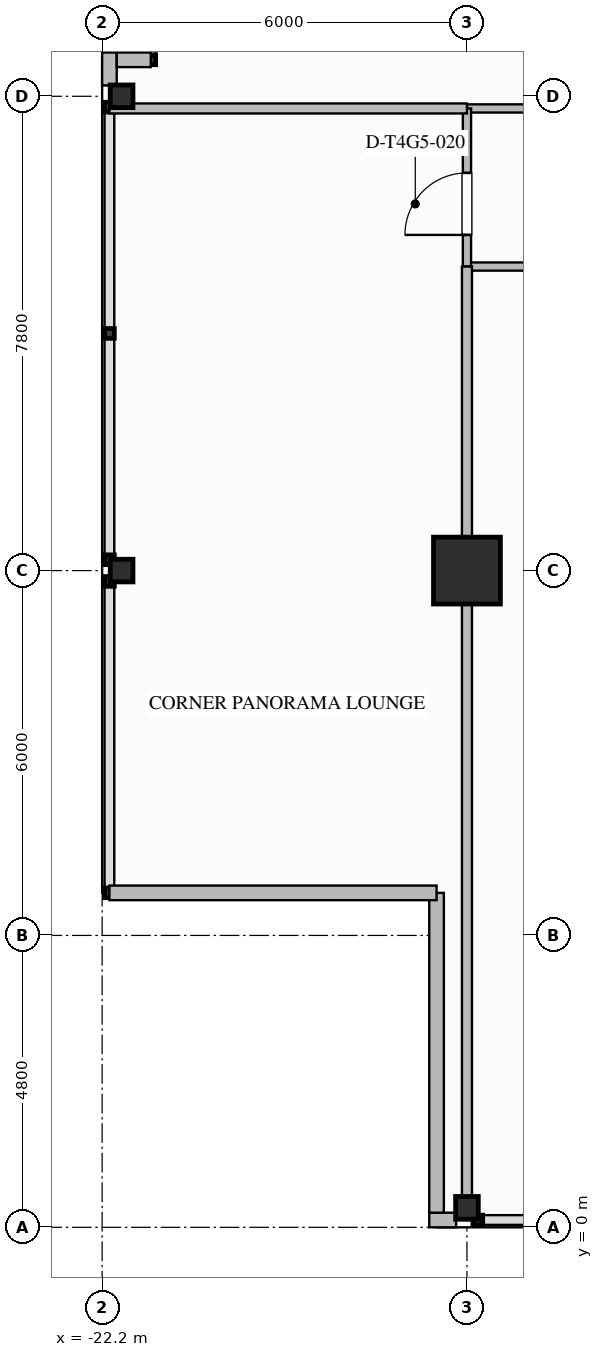
"""IFC4 building model, lengths in metres.
Left out: names, types, materials, properties, quantities, classifications, styles, units other than length and angle.
Written with IfcOpenShell. Run it as: python <this file> out.ifc"""

import sys

from ifc_helpers import new_model, si_unit, direction, frame, frame_2d, origin, origin_2d, place, context, subcontext, project, spatial, rectangle, i_section, extrude, element, fill, save


model = new_model("IFC4")
c1 = context("Model", 3, precision=1e-05, world=origin(), true_north=direction((0.0, 1.0)))
c2 = subcontext(c1, "Body", "Model", "MODEL_VIEW")
j1 = project(units=[si_unit("LENGTHUNIT", "METRE"), si_unit("PLANEANGLEUNIT", "RADIAN")], contexts=[c1])
p1 = place(None, origin())
s1 = spatial("IfcSite", under=j1, at=p1, CompositionType="ELEMENT")
p2 = place(p1, origin())
s2 = spatial("IfcBuilding", under=s1, at=p2, CompositionType="ELEMENT")
p3 = place(p2, frame((0.0, 0.0, 248.3)))
s3 = spatial("IfcBuildingStorey", under=s2, at=p3, CompositionType="ELEMENT", Elevation=248.3)
p4 = place(p3, frame((-16.2, 10.8, 0.0), z_axis=(0.0, 0.0, 1.0), x_axis=(1.0, 0.0, 0.0)))
e1 = element("IfcColumn", 1, at=p4, inside=s3, PredefinedType="COLUMN", context=c2, shape_type="SweptSolid", body=[
    extrude(rectangle(XDim=1.1, YDim=1.1, at=origin_2d()), origin(), (0.0, 0.0, 1.0), 3.6),
])
for number, where, z_axis, x_axis in (
    (2, (-21.88, 10.8, 0.0), (0.0, 0.0, 1.0), (1.0, 0.0, 0.0)),
    (3, (-21.88, 18.6, 0.0), (0.0, 0.0, 1.0), (1.0, 0.0, 0.0)),
    (4, (-16.2, 0.32, 0.0), (0.0, 0.0, 1.0), (0.0, 1.0, 0.0)),
):
    element("IfcColumn", number, at=place(p3, frame(where, z_axis=z_axis, x_axis=x_axis)), inside=s3, PredefinedType="COLUMN", context=c2, shape_type="SweptSolid", body=[
        extrude(i_section(OverallWidth=0.374, OverallDepth=0.372, WebThickness=0.016, FlangeThickness=0.026, FilletRadius=0.025, at=origin_2d()), origin(), (0.0, 0.0, 1.0), 3.597),
    ])
p5 = place(p3, frame((-22.08, 18.778, 0.0), z_axis=(0.0, 0.0, 1.0), x_axis=(0.0, 1.0, 0.0)))
e5 = element("IfcWall", 5, at=p5, inside=s3, PredefinedType="STANDARD", context=c2, shape_type="SweptSolid", body=[
    extrude(rectangle(XDim=0.542, YDim=0.24, at=frame_2d((0.271, 0.0))), origin(), (0.0, 0.0, 1.0), 3.34),
])
p6 = place(p3, frame((-16.378, 0.12, 0.0), z_axis=(0.0, 0.0, 1.0), x_axis=(-1.0, 0.0, 0.0)))
e6 = element("IfcWall", 6, at=p6, inside=s3, PredefinedType="STANDARD", context=c2, shape_type="SweptSolid", body=[
    extrude(rectangle(XDim=0.442, YDim=0.24, at=frame_2d((0.221, 0.0))), origin(), (0.0, 0.0, 1.0), 3.34),
])
p7 = place(p3, frame((-16.7, 0.24, 0.0), z_axis=(0.0, 0.0, 1.0), x_axis=(0.0, 1.0, 0.0)))
e7 = element("IfcWall", 7, at=p7, inside=s3, PredefinedType="STANDARD", context=c2, shape_type="SweptSolid", body=[
    extrude(rectangle(XDim=5.26, YDim=0.24, at=frame_2d((2.63, 0.0))), origin(), (0.0, 0.0, 1.0), 3.34),
])
p8 = place(p3, frame((-16.7, 5.5, 0.0), z_axis=(0.0, 0.0, 1.0), x_axis=(-1.0, 0.0, 0.0)))
e8 = element("IfcWall", 8, at=p8, inside=s3, PredefinedType="STANDARD", context=c2, shape_type="SweptSolid", body=[
    extrude(rectangle(XDim=5.38, YDim=0.24, at=frame_2d((2.69, 0.0))), origin(), (0.0, 0.0, 1.0), 3.34),
])
p9 = place(p3, frame((-21.96, 19.2, 0.0), z_axis=(0.0, 0.0, 1.0), x_axis=(1.0, 0.0, 0.0)))
e9 = element("IfcWall", 9, at=p9, inside=s3, PredefinedType="STANDARD", context=c2, shape_type="SweptSolid", body=[
    extrude(rectangle(XDim=0.56, YDim=0.24, at=frame_2d((0.28, 0.0))), origin(), (0.0, 0.0, 1.0), 3.34),
])
p10 = place(p3, frame((-16.2, 15.8, 0.0), z_axis=(0.0, 0.0, 1.0), x_axis=(1.0, 0.0, 0.0)))
e10 = element("IfcWall", 10, at=p10, inside=s3, PredefinedType="PARTITIONING", context=c2, shape_type="SweptSolid", body=[
    extrude(rectangle(XDim=38.28, YDim=0.135, at=frame_2d((19.14, 0.0))), origin(), (0.0, 0.0, 1.0), 3.34),
])
p11 = place(p10, frame((33.355, 0.0, 0.0)))
e11 = element("IfcOpeningElement", 11, at=p11, cuts=e10, PredefinedType="OPENING", context=c2, shape_type="SweptSolid", body=[
    extrude(rectangle(XDim=1.26, YDim=2.2, at=frame_2d((0.63, 1.1))), frame((0.0, 0.077, 0.0), z_axis=(0.0, -1.0, 0.0), x_axis=(1.0, 0.0, 0.0)), (0.0, 0.0, 1.0), 0.155),
])
p12 = place(p10, frame((1.252, 0.0, 0.0)))
e12 = element("IfcOpeningElement", 12, at=p12, cuts=e10, PredefinedType="OPENING", context=c2, shape_type="SweptSolid", body=[
    extrude(rectangle(XDim=1.26, YDim=2.2, at=frame_2d((0.63, 1.1))), frame((0.0, 0.077, 0.0), z_axis=(0.0, -1.0, 0.0), x_axis=(1.0, 0.0, 0.0)), (0.0, 0.0, 1.0), 0.155),
])
p13 = place(p10, frame((7.777, 0.0, 0.0)))
e13 = element("IfcOpeningElement", 13, at=p13, cuts=e10, PredefinedType="OPENING", context=c2, shape_type="SweptSolid", body=[
    extrude(rectangle(XDim=1.02, YDim=2.15, at=frame_2d((0.51, 1.075))), frame((0.0, 0.077, 0.0), z_axis=(0.0, -1.0, 0.0), x_axis=(1.0, 0.0, 0.0)), (0.0, 0.0, 1.0), 0.155),
])
p14 = place(p10, frame((11.445, 0.0, 0.0)))
e14 = element("IfcOpeningElement", 14, at=p14, cuts=e10, PredefinedType="OPENING", context=c2, shape_type="SweptSolid", body=[
    extrude(rectangle(XDim=1.26, YDim=2.2, at=frame_2d((0.63, 1.1))), frame((0.0, 0.077, 0.0), z_axis=(0.0, -1.0, 0.0), x_axis=(1.0, 0.0, 0.0)), (0.0, 0.0, 1.0), 0.155),
])
p15 = place(p10, frame((19.425, 0.0, 0.0)))
e15 = element("IfcOpeningElement", 15, at=p15, cuts=e10, PredefinedType="OPENING", context=c2, shape_type="SweptSolid", body=[
    extrude(rectangle(XDim=0.96, YDim=2.15, at=frame_2d((0.48, 1.075))), frame((0.0, 0.077, 0.0), z_axis=(0.0, -1.0, 0.0), x_axis=(1.0, 0.0, 0.0)), (0.0, 0.0, 1.0), 0.155),
])
p16 = place(p10, frame((23.183, 0.0, 0.0)))
e16 = element("IfcOpeningElement", 16, at=p16, cuts=e10, PredefinedType="OPENING", context=c2, shape_type="SweptSolid", body=[
    extrude(rectangle(XDim=1.02, YDim=2.15, at=frame_2d((0.51, 1.075))), frame((0.0, 0.077, 0.0), z_axis=(0.0, -1.0, 0.0), x_axis=(1.0, 0.0, 0.0)), (0.0, 0.0, 1.0), 0.155),
])
p17 = place(p10, frame((29.888, 0.0, 0.0)))
e17 = element("IfcOpeningElement", 17, at=p17, cuts=e10, PredefinedType="OPENING", context=c2, shape_type="SweptSolid", body=[
    extrude(rectangle(XDim=1.26, YDim=2.2, at=frame_2d((0.63, 1.1))), frame((0.0, 0.077, 0.0), z_axis=(0.0, -1.0, 0.0), x_axis=(1.0, 0.0, 0.0)), (0.0, 0.0, 1.0), 0.155),
])
p18 = place(p3, frame((-16.2, 18.4, 0.0), z_axis=(0.0, 0.0, 1.0), x_axis=(1.0, 0.0, 0.0)))
e18 = element("IfcWall", 18, at=p18, inside=s3, PredefinedType="PARTITIONING", context=c2, shape_type="SweptSolid", body=[
    extrude(rectangle(XDim=7.6, YDim=0.135, at=frame_2d((3.8, 0.0))), origin(), (0.0, 0.0, 1.0), 2.717),
])
p19 = place(p18, frame((2.155, 0.0, 0.0)))
e19 = element("IfcOpeningElement", 19, at=p19, cuts=e18, PredefinedType="OPENING", context=c2, shape_type="SweptSolid", body=[
    extrude(rectangle(XDim=1.26, YDim=2.2, at=frame_2d((0.63, 1.1))), frame((0.0, 0.077, 0.0), z_axis=(0.0, -1.0, 0.0), x_axis=(1.0, 0.0, 0.0)), (0.0, 0.0, 1.0), 0.155),
])
p20 = place(p3, frame((-16.2, 15.8, 0.0), z_axis=(0.0, 0.0, 1.0), x_axis=(0.0, 1.0, 0.0)))
e20 = element("IfcWall", 20, at=p20, inside=s3, PredefinedType="PARTITIONING", context=c2, shape_type="SweptSolid", body=[
    extrude(rectangle(XDim=2.6, YDim=0.135, at=frame_2d((1.3, 0.0))), origin(), (0.0, 0.0, 1.0), 2.714),
])
p21 = place(p20, frame((0.52, 0.0, 0.0)))
e21 = element("IfcOpeningElement", 21, at=p21, cuts=e20, PredefinedType="OPENING", context=c2, shape_type="SweptSolid", body=[
    extrude(rectangle(XDim=1.02, YDim=2.15, at=frame_2d((0.51, 1.075))), frame((0.0, 0.077, 0.0), z_axis=(0.0, -1.0, 0.0), x_axis=(1.0, 0.0, 0.0)), (0.0, 0.0, 1.0), 0.155),
])
p22 = place(p3, frame((-16.2, 0.12, 0.0), z_axis=(0.0, 0.0, 1.0), x_axis=(0.0, 1.0, 0.0)))
e22 = element("IfcWall", 22, at=p22, inside=s3, PredefinedType="PARTITIONING", context=c2, shape_type="SweptSolid", body=[
    extrude(rectangle(XDim=15.68, YDim=0.165, at=frame_2d((7.84, 0.0))), origin(), (0.0, 0.0, 1.0), 2.714),
])
p23 = place(p3, frame((-22.08, 18.4, 0.0), z_axis=(0.0, 0.0, 1.0), x_axis=(1.0, 0.0, 0.0)))
e23 = element("IfcWall", 23, at=p23, inside=s3, PredefinedType="PARTITIONING", context=c2, shape_type="SweptSolid", body=[
    extrude(rectangle(XDim=5.88, YDim=0.165, at=frame_2d((2.94, 0.0))), origin(), (0.0, 0.0, 1.0), 2.714),
])
p24 = place(p21, origin())
e24 = element("IfcDoor", 24, at=p24, inside=s3, OperationType="SINGLE_SWING_LEFT", PredefinedType="DOOR", context=c2, shape_type="SweptSolid", body=[
    extrude(rectangle(XDim=1.02, YDim=2.15, at=frame_2d((0.51, 1.075))), frame((0.0, 0.025, 0.0), z_axis=(0.0, -1.0, 0.0), x_axis=(1.0, 0.0, 0.0)), (0.0, 0.0, 1.0), 0.05),
])
fill(e21, e24)
save(model, sys.argv[1])
